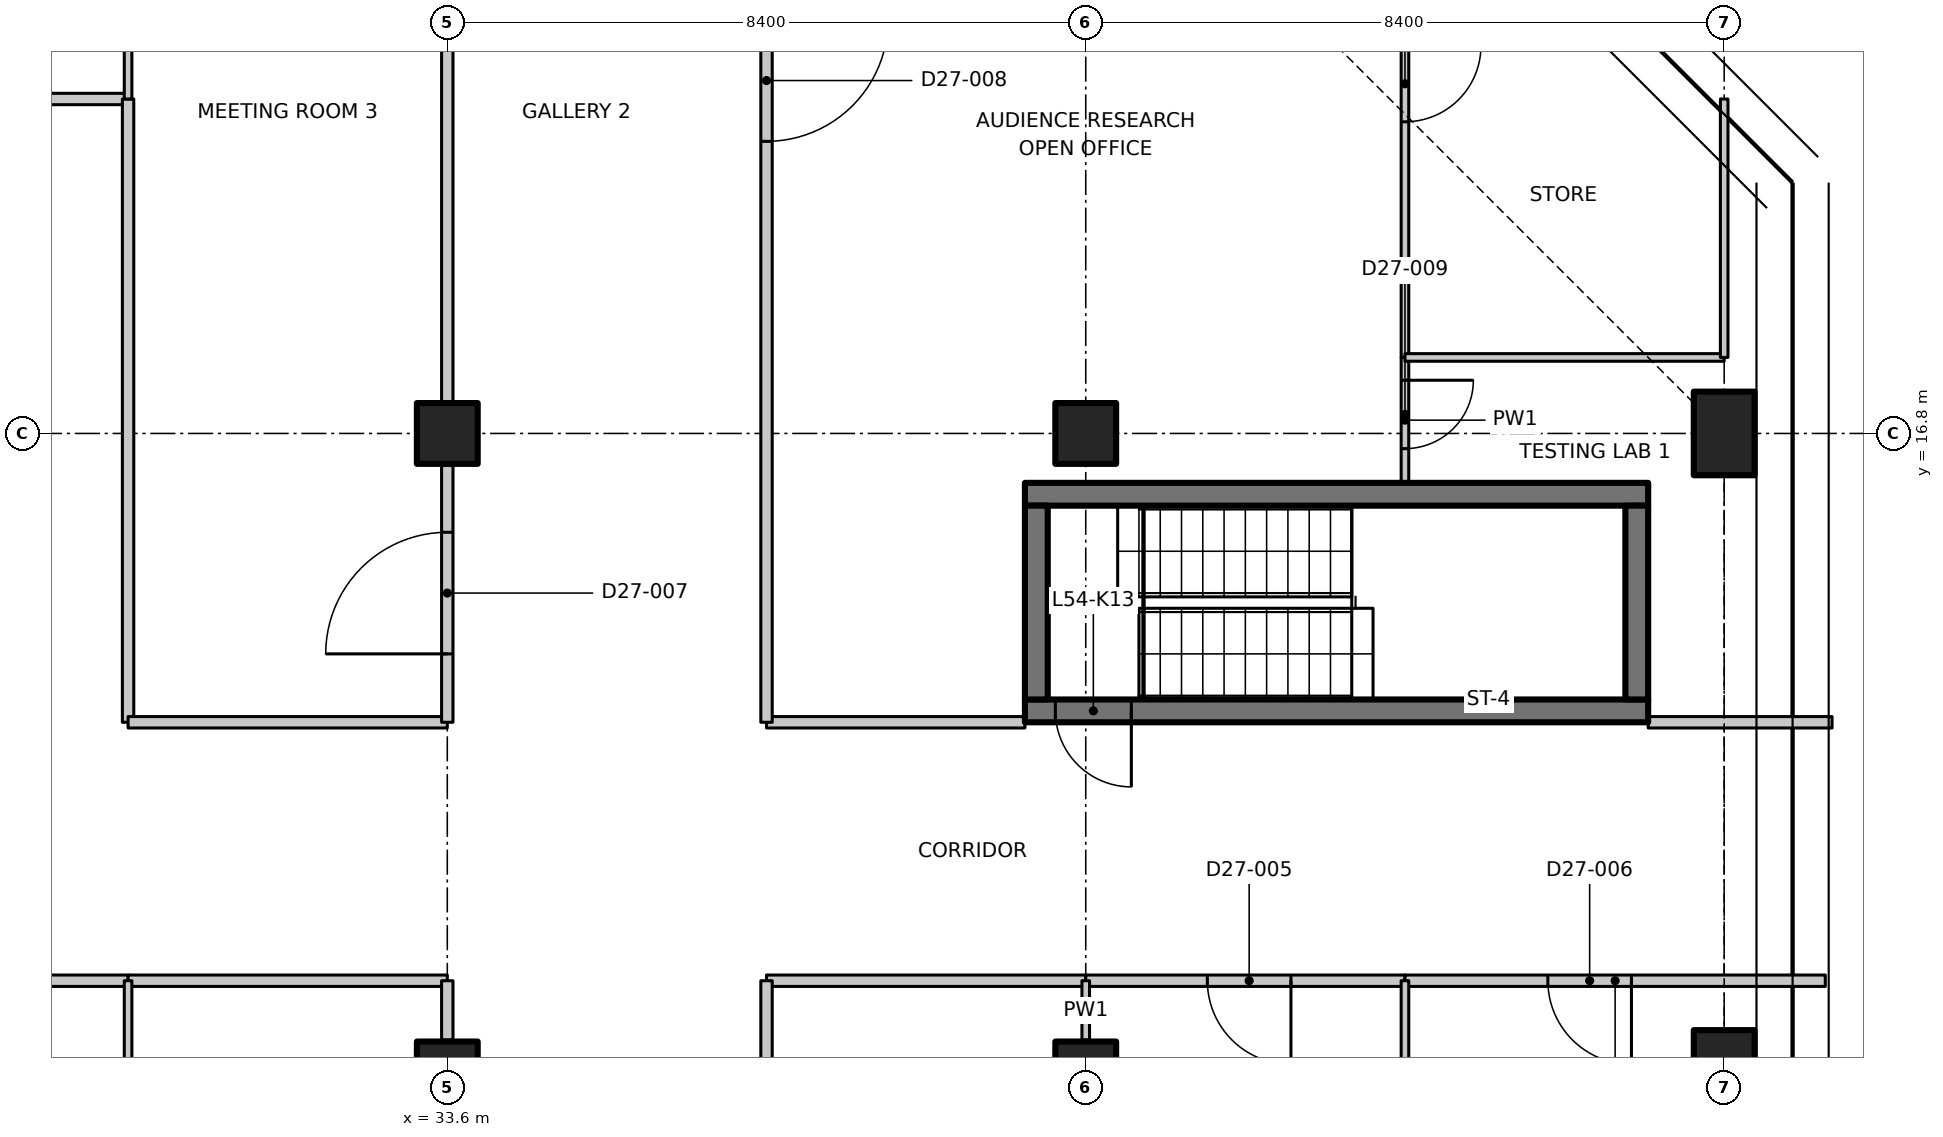
"""IFC4 building model, lengths in metres.
Left out: names, types, materials, properties, quantities, classifications, styles, units other than length and angle.
Written with IfcOpenShell. Run it as: python <this file> out.ifc"""

import sys

from ifc_helpers import new_model, si_unit, direction, frame, frame_2d, origin, origin_2d, place, context, subcontext, project, spatial, polyline, rectangle, outline, extrude, element, fill, save


model = new_model("IFC4")
c1 = context("Model", 3, precision=1e-05, world=origin(), true_north=direction((0.0, 1.0)))
c2 = subcontext(c1, "Body", "Model", "MODEL_VIEW")
j1 = project(units=[si_unit("LENGTHUNIT", "METRE"), si_unit("PLANEANGLEUNIT", "RADIAN")], contexts=[c1])
p1 = place(None, origin())
s1 = spatial("IfcSite", under=j1, at=p1, CompositionType="ELEMENT")
p2 = place(p1, origin())
s2 = spatial("IfcBuilding", under=s1, at=p2, CompositionType="ELEMENT")
p3 = place(p2, frame((0.0, 0.0, 215.7)))
s3 = spatial("IfcBuildingStorey", under=s2, at=p3, CompositionType="ELEMENT", Elevation=215.7)
for number, where, z_axis, x_axis in (
    (1, (33.6, 8.4, 0.0), (0.0, 0.0, 1.0), (1.0, 0.0, 0.0)),
    (2, (33.6, 16.8, 0.0), (0.0, 0.0, 1.0), (1.0, 0.0, 0.0)),
    (3, (42.0, 8.4, 0.0), (0.0, 0.0, 1.0), (1.0, 0.0, 0.0)),
    (4, (42.0, 16.8, 0.0), (0.0, 0.0, 1.0), (1.0, 0.0, 0.0)),
):
    element("IfcColumn", number, at=place(p3, frame(where, z_axis=z_axis, x_axis=x_axis)), inside=s3, PredefinedType="COLUMN", context=c2, shape_type="SweptSolid", body=[
        extrude(rectangle(XDim=0.8, YDim=0.8, at=origin_2d()), origin(), (0.0, 0.0, 1.0), 3.35),
    ])
for number, where, z_axis, x_axis in (
    (5, (50.4, 8.4, 0.0), (0.0, 0.0, 1.0), (1.0, 0.0, 0.0)),
    (6, (50.4, 16.8, 0.0), (0.0, 0.0, 1.0), (1.0, 0.0, 0.0)),
):
    element("IfcColumn", number, at=place(p3, frame(where, z_axis=z_axis, x_axis=x_axis)), inside=s3, PredefinedType="COLUMN", context=c2, shape_type="SweptSolid", body=[
        extrude(rectangle(XDim=0.8, YDim=1.1, at=origin_2d()), origin(), (0.0, 0.0, 1.0), 3.35),
    ])
p4 = place(p3, frame((49.4, 13.15, 0.0), z_axis=(0.0, 0.0, 1.0), x_axis=(-1.0, 0.0, 0.0)))
e7 = element("IfcWall", 7, at=p4, inside=s3, PredefinedType="SHEAR", context=c2, shape_type="SweptSolid", body=[
    extrude(rectangle(XDim=8.2, YDim=0.3, at=frame_2d((4.1, 0.0))), origin(), (0.0, 0.0, 1.0), 3.35),
])
p5 = place(p4, frame((6.8, 0.0, 0.0)))
e8 = element("IfcOpeningElement", 8, at=p5, cuts=e7, PredefinedType="OPENING", context=c2, shape_type="SweptSolid", body=[
    extrude(rectangle(XDim=1.0, YDim=2.1, at=frame_2d((0.5, 1.05))), frame((0.0, 0.16, 0.0), z_axis=(0.0, -1.0, 0.0), x_axis=(1.0, 0.0, 0.0)), (0.0, 0.0, 1.0), 0.32),
])
p6 = place(p3, frame((41.2, 16.0, 0.0), z_axis=(0.0, 0.0, 1.0), x_axis=(1.0, 0.0, 0.0)))
e9 = element("IfcWall", 9, at=p6, inside=s3, PredefinedType="SHEAR", context=c2, shape_type="SweptSolid", body=[
    extrude(rectangle(XDim=8.2, YDim=0.3, at=frame_2d((4.1, 0.0))), origin(), (0.0, 0.0, 1.0), 3.35),
])
for number, where, z_axis, x_axis in (
    (10, (41.35, 13.3, 0.0), (0.0, 0.0, 1.0), (0.0, 1.0, 0.0)),
    (11, (49.25, 13.3, 0.0), (0.0, 0.0, 1.0), (0.0, 1.0, 0.0)),
):
    element("IfcWall", number, at=place(p3, frame(where, z_axis=z_axis, x_axis=x_axis)), inside=s3, PredefinedType="SHEAR", context=c2, shape_type="SweptSolid", body=[
        extrude(rectangle(XDim=2.55, YDim=0.3, at=frame_2d((1.275, 0.0))), origin(), (0.0, 0.0, 1.0), 3.35),
    ])
p7 = place(p3, frame((25.2, 21.2, 0.0), z_axis=(0.0, 0.0, 1.0), x_axis=(1.0, 0.0, 0.0)))
e12 = element("IfcWall", 12, at=p7, inside=s3, PredefinedType="PARTITIONING", context=c2, shape_type="SweptSolid", body=[
    extrude(rectangle(XDim=4.2, YDim=0.15, at=frame_2d((2.1, 0.0))), origin(), (0.0, 0.0, 1.0), 3.33),
])
p8 = place(p7, frame((1.5, 0.0, 0.0)))
e13 = element("IfcOpeningElement", 13, at=p8, cuts=e12, PredefinedType="OPENING", context=c2, shape_type="SweptSolid", body=[
    extrude(rectangle(XDim=1.0, YDim=2.1, at=frame_2d((0.5, 1.05))), frame((0.0, 0.085, 0.0), z_axis=(0.0, -1.0, 0.0), x_axis=(1.0, 0.0, 0.0)), (0.0, 0.0, 1.0), 0.17),
])
p9 = place(p3, frame((29.4, 9.6, 0.0), z_axis=(0.0, 0.0, 1.0), x_axis=(-1.0, 0.0, 0.0)))
e14 = element("IfcWall", 14, at=p9, inside=s3, PredefinedType="PARTITIONING", context=c2, shape_type="SweptSolid", body=[
    extrude(rectangle(XDim=4.2, YDim=0.15, at=frame_2d((2.1, 0.0))), origin(), (0.0, 0.0, 1.0), 3.33),
])
p10 = place(p9, frame((1.2, 0.0, 0.0)))
e15 = element("IfcOpeningElement", 15, at=p10, cuts=e14, PredefinedType="OPENING", context=c2, shape_type="SweptSolid", body=[
    extrude(rectangle(XDim=1.6, YDim=2.1, at=frame_2d((0.8, 1.05))), frame((0.0, 0.085, 0.0), z_axis=(0.0, -1.0, 0.0), x_axis=(1.0, 0.0, 0.0)), (0.0, 0.0, 1.0), 0.17),
])
p11 = place(p3, frame((29.4, 21.2, 0.0), z_axis=(0.0, 0.0, 1.0), x_axis=(0.0, -1.0, 0.0)))
e16 = element("IfcWall", 16, at=p11, inside=s3, PredefinedType="PARTITIONING", context=c2, shape_type="SweptSolid", body=[
    extrude(rectangle(XDim=8.2, YDim=0.15, at=frame_2d((4.1, 0.0))), origin(), (0.0, 0.0, 1.0), 3.33),
])
p12 = place(p3, frame((29.4, 27.429, 0.0), z_axis=(0.0, 0.0, 1.0), x_axis=(0.0, -1.0, 0.0)))
e17 = element("IfcWall", 17, at=p12, inside=s3, PredefinedType="PARTITIONING", context=c2, shape_type="SweptSolid", body=[
    extrude(outline(polyline([(0.0, 0.0), (6.229, 0.0), (6.229, 3.33), (2.679, 3.33), (2.677, 2.98), (1.781, 2.98), (1.779, 3.33), (0.154, 3.33), (0.0, 3.33), (0.0, 0.0)])), frame((0.0, 0.05, 0.0), z_axis=(0.0, -1.0, 0.0), x_axis=(1.0, 0.0, 0.0)), (0.0, 0.0, 1.0), 0.1),
])
p13 = place(p3, frame((33.6, 9.6, 0.0), z_axis=(0.0, 0.0, 1.0), x_axis=(-1.0, 0.0, 0.0)))
e18 = element("IfcWall", 18, at=p13, inside=s3, PredefinedType="PARTITIONING", context=c2, shape_type="SweptSolid", body=[
    extrude(rectangle(XDim=4.2, YDim=0.15, at=frame_2d((2.1, 0.0))), origin(), (0.0, 0.0, 1.0), 3.33),
])
p14 = place(p3, frame((42.0, 9.6, 0.0), z_axis=(0.0, 0.0, 1.0), x_axis=(-1.0, 0.0, 0.0)))
e19 = element("IfcWall", 19, at=p14, inside=s3, PredefinedType="PARTITIONING", context=c2, shape_type="SweptSolid", body=[
    extrude(rectangle(XDim=4.2, YDim=0.15, at=frame_2d((2.1, 0.0))), origin(), (0.0, 0.0, 1.0), 3.33),
])
p15 = place(p3, frame((46.2, 9.6, 0.0), z_axis=(0.0, 0.0, 1.0), x_axis=(-1.0, 0.0, 0.0)))
e20 = element("IfcWall", 20, at=p15, inside=s3, PredefinedType="PARTITIONING", context=c2, shape_type="SweptSolid", body=[
    extrude(rectangle(XDim=4.2, YDim=0.15, at=frame_2d((2.1, 0.0))), origin(), (0.0, 0.0, 1.0), 3.33),
])
p16 = place(p15, frame((1.5, 0.0, 0.0)))
e21 = element("IfcOpeningElement", 21, at=p16, cuts=e20, PredefinedType="OPENING", context=c2, shape_type="SweptSolid", body=[
    extrude(rectangle(XDim=1.1, YDim=2.1, at=frame_2d((0.55, 1.05))), frame((0.0, 0.085, 0.0), z_axis=(0.0, -1.0, 0.0), x_axis=(1.0, 0.0, 0.0)), (0.0, 0.0, 1.0), 0.17),
])
p17 = place(p3, frame((51.73, 9.6, 0.0), z_axis=(0.0, 0.0, 1.0), x_axis=(-1.0, 0.0, 0.0)))
e22 = element("IfcWall", 22, at=p17, inside=s3, PredefinedType="PARTITIONING", context=c2, shape_type="SweptSolid", body=[
    extrude(outline(polyline([(0.0, 0.0), (5.531, 0.0), (5.531, 3.33), (1.781, 3.33), (1.779, 2.98), (0.883, 2.98), (0.881, 3.33), (0.25, 3.33), (0.0, 3.33), (0.0, 0.0)])), frame((0.0, 0.075, 0.0), z_axis=(0.0, -1.0, 0.0), x_axis=(1.0, 0.0, 0.0)), (0.0, 0.0, 1.0), 0.15),
])
p18 = place(p17, frame((2.551, 0.0, 0.0)))
e23 = element("IfcOpeningElement", 23, at=p18, cuts=e22, PredefinedType="OPENING", context=c2, shape_type="SweptSolid", body=[
    extrude(rectangle(XDim=1.1, YDim=2.1, at=frame_2d((0.55, 1.05))), frame((0.0, 0.085, 0.0), z_axis=(0.0, -1.0, 0.0), x_axis=(1.0, 0.0, 0.0)), (0.0, 0.0, 1.0), 0.17),
])
p19 = place(p3, frame((29.4, 13.0, 0.0), z_axis=(0.0, 0.0, 1.0), x_axis=(1.0, 0.0, 0.0)))
e24 = element("IfcWall", 24, at=p19, inside=s3, PredefinedType="PARTITIONING", context=c2, shape_type="SweptSolid", body=[
    extrude(rectangle(XDim=4.2, YDim=0.15, at=frame_2d((2.1, 0.0))), origin(), (0.0, 0.0, 1.0), 3.33),
])
p20 = place(p3, frame((37.8, 13.0, 0.0), z_axis=(0.0, 0.0, 1.0), x_axis=(1.0, 0.0, 0.0)))
e25 = element("IfcWall", 25, at=p20, inside=s3, PredefinedType="PARTITIONING", context=c2, shape_type="SweptSolid", body=[
    extrude(rectangle(XDim=3.4, YDim=0.15, at=frame_2d((1.7, 0.0))), origin(), (0.0, 0.0, 1.0), 3.33),
])
p21 = place(p3, frame((49.4, 13.0, 0.0), z_axis=(0.0, 0.0, 1.0), x_axis=(1.0, 0.0, 0.0)))
e26 = element("IfcWall", 26, at=p21, inside=s3, PredefinedType="PARTITIONING", context=c2, shape_type="SweptSolid", body=[
    extrude(rectangle(XDim=2.42, YDim=0.15, at=frame_2d((1.21, 0.0))), origin(), (0.0, 0.0, 1.0), 2.98),
])
p22 = place(p3, frame((33.6, 8.82, 0.0), z_axis=(0.0, 0.0, 1.0), x_axis=(0.0, 1.0, 0.0)))
e27 = element("IfcWall", 27, at=p22, inside=s3, PredefinedType="PARTITIONING", context=c2, shape_type="SweptSolid", body=[
    extrude(rectangle(XDim=0.78, YDim=0.15, at=frame_2d((0.39, 0.0))), origin(), (0.0, 0.0, 1.0), 3.33),
])
p23 = place(p3, frame((37.8, 9.6, 0.0), z_axis=(0.0, 0.0, 1.0), x_axis=(0.0, -1.0, 0.0)))
e28 = element("IfcWall", 28, at=p23, inside=s3, PredefinedType="PARTITIONING", context=c2, shape_type="SweptSolid", body=[
    extrude(outline(polyline([(0.0, 0.0), (13.106, 0.0), (13.105, 3.33), (12.622, 3.33), (10.05, 3.33), (10.048, 2.98), (9.152, 2.98), (9.15, 3.33), (0.0, 3.33), (0.0, 0.0)])), frame((0.0, 0.075, 0.0), z_axis=(0.0, -1.0, 0.0), x_axis=(1.0, 0.0, 0.0)), (0.0, 0.0, 1.0), 0.15),
])
p24 = place(p23, frame((5.7, 0.0, 0.0)))
e29 = element("IfcOpeningElement", 29, at=p24, cuts=e28, PredefinedType="OPENING", context=c2, shape_type="SweptSolid", body=[
    extrude(rectangle(XDim=1.1, YDim=2.1, at=frame_2d((0.55, 1.05))), frame((0.0, 0.085, 0.0), z_axis=(0.0, -1.0, 0.0), x_axis=(1.0, 0.0, 0.0)), (0.0, 0.0, 1.0), 0.17),
])
p25 = place(p3, frame((29.4, 9.6, 0.0), z_axis=(0.0, 0.0, 1.0), x_axis=(0.0, -1.0, 0.0)))
e30 = element("IfcWall", 30, at=p25, inside=s3, PredefinedType="PARTITIONING", context=c2, shape_type="SweptSolid", body=[
    extrude(outline(polyline([(0.0, 0.0), (12.6, 0.0), (12.6, 3.33), (10.05, 3.33), (10.048, 2.98), (9.152, 2.98), (9.15, 3.33), (0.0, 3.33), (0.0, 0.0)])), frame((0.0, 0.05, 0.0), z_axis=(0.0, -1.0, 0.0), x_axis=(1.0, 0.0, 0.0)), (0.0, 0.0, 1.0), 0.1),
])
p26 = place(p3, frame((42.0, 9.6, 0.0), z_axis=(0.0, 0.0, 1.0), x_axis=(0.0, -1.0, 0.0)))
e31 = element("IfcWall", 31, at=p26, inside=s3, PredefinedType="PARTITIONING", context=c2, shape_type="SweptSolid", body=[
    extrude(rectangle(XDim=0.78, YDim=0.1, at=frame_2d((0.39, 0.0))), origin(), (0.0, 0.0, 1.0), 3.33),
])
p27 = place(p3, frame((46.2, 9.6, 0.0), z_axis=(0.0, 0.0, 1.0), x_axis=(0.0, -1.0, 0.0)))
e32 = element("IfcWall", 32, at=p27, inside=s3, PredefinedType="PARTITIONING", context=c2, shape_type="SweptSolid", body=[
    extrude(outline(polyline([(0.0, 0.0), (9.8, 0.0), (9.8, 3.33), (6.066, 3.33), (6.064, 2.98), (4.736, 2.98), (4.734, 3.33), (0.0, 3.33), (0.0, 0.0)])), frame((0.0, 0.05, 0.0), z_axis=(0.0, -1.0, 0.0), x_axis=(1.0, 0.0, 0.0)), (0.0, 0.0, 1.0), 0.1),
])
p28 = place(p3, frame((33.6, 13.0, 0.0), z_axis=(0.0, 0.0, 1.0), x_axis=(0.0, 1.0, 0.0)))
e33 = element("IfcWall", 33, at=p28, inside=s3, PredefinedType="PARTITIONING", context=c2, shape_type="SweptSolid", body=[
    extrude(rectangle(XDim=3.38, YDim=0.15, at=frame_2d((1.69, 0.0))), origin(), (0.0, 0.0, 1.0), 3.33),
])
p29 = place(p28, frame((0.9, 0.0, 0.0)))
e34 = element("IfcOpeningElement", 34, at=p29, cuts=e33, PredefinedType="OPENING", context=c2, shape_type="SweptSolid", body=[
    extrude(rectangle(XDim=1.6, YDim=2.1, at=frame_2d((0.8, 1.05))), frame((0.0, 0.085, 0.0), z_axis=(0.0, -1.0, 0.0), x_axis=(1.0, 0.0, 0.0)), (0.0, 0.0, 1.0), 0.17),
])
p30 = place(p3, frame((33.6, 17.22, 0.0), z_axis=(0.0, 0.0, 1.0), x_axis=(0.0, 1.0, 0.0)))
e35 = element("IfcWall", 35, at=p30, inside=s3, PredefinedType="PARTITIONING", context=c2, shape_type="SweptSolid", body=[
    extrude(outline(polyline([(0.0, 0.0), (7.585, 0.0), (7.585, 2.98), (7.532, 2.98), (7.53, 3.33), (0.0, 3.33), (0.0, 0.0)])), frame((0.0, 0.075, 0.0), z_axis=(0.0, -1.0, 0.0), x_axis=(1.0, 0.0, 0.0)), (0.0, 0.0, 1.0), 0.15),
])
p31 = place(p3, frame((37.8, 30.243, 0.0), z_axis=(0.0, 0.0, 1.0), x_axis=(0.0, -1.0, 0.0)))
e36 = element("IfcWall", 36, at=p31, inside=s3, PredefinedType="PARTITIONING", context=c2, shape_type="SweptSolid", body=[
    extrude(outline(polyline([(0.0, 0.0), (17.243, 0.0), (17.243, 3.33), (5.493, 3.33), (5.491, 2.98), (4.595, 2.98), (4.593, 3.33), (0.0, 3.33), (0.0, 0.0)])), frame((0.0, 0.075, 0.0), z_axis=(0.0, -1.0, 0.0), x_axis=(1.0, 0.0, 0.0)), (0.0, 0.0, 1.0), 0.15),
])
p32 = place(p31, frame((8.0, 0.0, 0.0)))
e37 = element("IfcOpeningElement", 37, at=p32, cuts=e36, PredefinedType="OPENING", context=c2, shape_type="SweptSolid", body=[
    extrude(rectangle(XDim=1.6, YDim=2.1, at=frame_2d((0.8, 1.05))), frame((0.0, 0.085, 0.0), z_axis=(0.0, -1.0, 0.0), x_axis=(1.0, 0.0, 0.0)), (0.0, 0.0, 1.0), 0.17),
])
p33 = place(p3, frame((46.2, 17.8, 0.0), z_axis=(0.0, 0.0, 1.0), x_axis=(0.0, -1.0, 0.0)))
e38 = element("IfcWall", 38, at=p33, inside=s3, PredefinedType="PARTITIONING", context=c2, shape_type="SweptSolid", body=[
    extrude(rectangle(XDim=1.65, YDim=0.1, at=frame_2d((0.825, 0.0))), origin(), (0.0, 0.0, 1.0), 3.33),
])
p34 = place(p33, frame((0.3, 0.0, 0.0)))
e39 = element("IfcOpeningElement", 39, at=p34, cuts=e38, PredefinedType="OPENING", context=c2, shape_type="SweptSolid", body=[
    extrude(rectangle(XDim=0.9, YDim=2.1, at=frame_2d((0.45, 1.05))), frame((0.0, 0.06, 0.0), z_axis=(0.0, -1.0, 0.0), x_axis=(1.0, 0.0, 0.0)), (0.0, 0.0, 1.0), 0.12),
])
p35 = place(p3, frame((46.2, 25.502, 0.0), z_axis=(0.0, 0.0, 1.0), x_axis=(0.0, -1.0, 0.0)))
e40 = element("IfcWall", 40, at=p35, inside=s3, PredefinedType="PARTITIONING", context=c2, shape_type="SweptSolid", body=[
    extrude(outline(polyline([(0.0, 0.0), (7.702, 0.0), (7.702, 3.33), (5.168, 3.33), (5.166, 2.98), (3.839, 2.98), (3.837, 3.33), (0.103, 3.33), (0.0, 3.33), (0.0, 0.0)])), frame((0.0, 0.05, 0.0), z_axis=(0.0, -1.0, 0.0), x_axis=(1.0, 0.0, 0.0)), (0.0, 0.0, 1.0), 0.1),
])
p36 = place(p35, frame((3.603, 0.0, 0.0)))
e41 = element("IfcOpeningElement", 41, at=p36, cuts=e40, PredefinedType="OPENING", context=c2, shape_type="SweptSolid", body=[
    extrude(rectangle(XDim=1.0, YDim=2.1, at=frame_2d((0.5, 1.05))), frame((0.0, 0.06, 0.0), z_axis=(0.0, -1.0, 0.0), x_axis=(1.0, 0.0, 0.0)), (0.0, 0.0, 1.0), 0.12),
])
p37 = place(p3, frame((46.2, 17.8, 0.0), z_axis=(0.0, 0.0, 1.0), x_axis=(1.0, 0.0, 0.0)))
e42 = element("IfcWall", 42, at=p37, inside=s3, PredefinedType="PARTITIONING", context=c2, shape_type="SweptSolid", body=[
    extrude(rectangle(XDim=4.2, YDim=0.1, at=frame_2d((2.1, 0.0))), origin(), (0.0, 0.0, 1.0), 2.98),
])
p38 = place(p3, frame((50.4, 17.8, 0.0), z_axis=(0.0, 0.0, 1.0), x_axis=(0.0, 1.0, 0.0)))
e43 = element("IfcWall", 43, at=p38, inside=s3, PredefinedType="PARTITIONING", context=c2, shape_type="SweptSolid", body=[
    extrude(rectangle(XDim=3.4, YDim=0.1, at=frame_2d((1.7, 0.0))), origin(), (0.0, 0.0, 1.0), 3.33),
])
p39 = place(p5, origin())
e44 = element("IfcDoor", 44, at=p39, inside=s3, OperationType="SINGLE_SWING_RIGHT", PredefinedType="DOOR", context=c2, shape_type="SweptSolid", body=[
    extrude(rectangle(XDim=1.0, YDim=2.1, at=frame_2d((0.5, 1.05))), frame((0.0, 0.025, 0.0), z_axis=(0.0, -1.0, 0.0), x_axis=(1.0, 0.0, 0.0)), (0.0, 0.0, 1.0), 0.05),
])
fill(e8, e44)
p40 = place(p16, origin())
e45 = element("IfcDoor", 45, at=p40, inside=s3, OperationType="SINGLE_SWING_LEFT", PredefinedType="DOOR", context=c2, shape_type="SweptSolid", body=[
    extrude(rectangle(XDim=1.1, YDim=2.1, at=frame_2d((0.55, 1.05))), frame((0.0, 0.025, 0.0), z_axis=(0.0, -1.0, 0.0), x_axis=(1.0, 0.0, 0.0)), (0.0, 0.0, 1.0), 0.05),
])
fill(e21, e45)
p41 = place(p18, origin())
e46 = element("IfcDoor", 46, at=p41, inside=s3, OperationType="SINGLE_SWING_LEFT", PredefinedType="DOOR", context=c2, shape_type="SweptSolid", body=[
    extrude(rectangle(XDim=1.1, YDim=2.1, at=frame_2d((0.55, 1.05))), frame((0.0, 0.025, 0.0), z_axis=(0.0, -1.0, 0.0), x_axis=(1.0, 0.0, 0.0)), (0.0, 0.0, 1.0), 0.05),
])
fill(e23, e46)
p42 = place(p29, origin())
e47 = element("IfcDoor", 47, at=p42, inside=s3, OperationType="DOUBLE_DOOR_SINGLE_SWING", PredefinedType="DOOR", context=c2, shape_type="SweptSolid", body=[
    extrude(rectangle(XDim=1.6, YDim=2.1, at=frame_2d((0.8, 1.05))), frame((0.0, 0.025, 0.0), z_axis=(0.0, -1.0, 0.0), x_axis=(1.0, 0.0, 0.0)), (0.0, 0.0, 1.0), 0.05),
])
fill(e34, e47)
p43 = place(p32, origin())
e48 = element("IfcDoor", 48, at=p43, inside=s3, OperationType="DOUBLE_DOOR_SINGLE_SWING", PredefinedType="DOOR", context=c2, shape_type="SweptSolid", body=[
    extrude(rectangle(XDim=1.6, YDim=2.1, at=frame_2d((0.8, 1.05))), frame((0.0, 0.025, 0.0), z_axis=(0.0, -1.0, 0.0), x_axis=(1.0, 0.0, 0.0)), (0.0, 0.0, 1.0), 0.05),
])
fill(e37, e48)
p44 = place(p34, origin())
e49 = element("IfcDoor", 49, at=p44, inside=s3, OperationType="SINGLE_SWING_LEFT", PredefinedType="DOOR", context=c2, shape_type="SweptSolid", body=[
    extrude(rectangle(XDim=0.9, YDim=2.1, at=frame_2d((0.45, 1.05))), frame((0.0, 0.025, 0.0), z_axis=(0.0, -1.0, 0.0), x_axis=(1.0, 0.0, 0.0)), (0.0, 0.0, 1.0), 0.05),
])
fill(e39, e49)
p45 = place(p36, origin())
e50 = element("IfcDoor", 50, at=p45, inside=s3, OperationType="SINGLE_SWING_LEFT", PredefinedType="DOOR", context=c2, shape_type="SweptSolid", body=[
    extrude(rectangle(XDim=1.0, YDim=2.1, at=frame_2d((0.5, 1.05))), frame((0.0, 0.025, 0.0), z_axis=(0.0, -1.0, 0.0), x_axis=(1.0, 0.0, 0.0)), (0.0, 0.0, 1.0), 0.05),
])
fill(e41, e50)
save(model, sys.argv[1])
